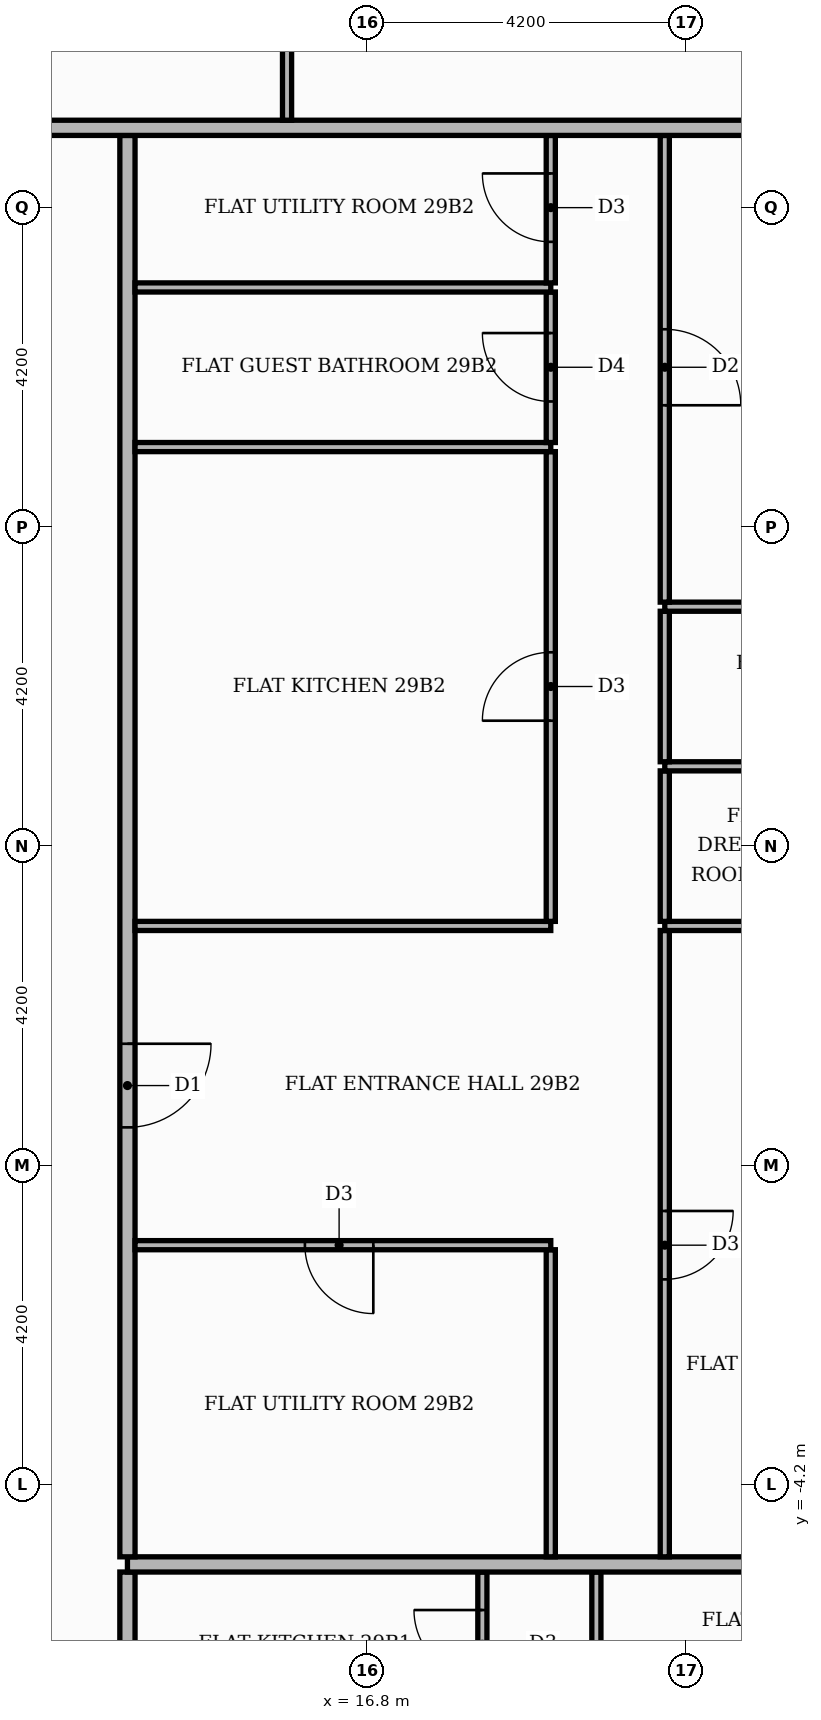
"""IFC4 building model, lengths in metres.
Left out: names, types, materials, properties, quantities, classifications, styles, units other than length and angle.
Written with IfcOpenShell. Run it as: python <this file> out.ifc"""

import sys

from ifc_helpers import new_model, si_unit, direction, frame, frame_2d, origin, place, context, subcontext, project, spatial, rectangle, extrude, element, fill, save


model = new_model("IFC4")
c1 = context("Model", 3, precision=1e-05, world=origin(), true_north=direction((0.0, 1.0)))
c2 = subcontext(c1, "Body", "Model", "MODEL_VIEW")
j1 = project(units=[si_unit("LENGTHUNIT", "METRE"), si_unit("PLANEANGLEUNIT", "RADIAN")], contexts=[c1])
p1 = place(None, origin())
s1 = spatial("IfcSite", under=j1, at=p1, CompositionType="ELEMENT")
p2 = place(p1, origin())
s2 = spatial("IfcBuilding", under=s1, at=p2, CompositionType="ELEMENT")
p3 = place(p2, frame((0.0, 0.0, 122.1)))
s3 = spatial("IfcBuildingStorey", under=s2, at=p3, CompositionType="ELEMENT", Elevation=122.1)
p4 = place(p3, frame((13.65, -13.55, 0.0), z_axis=(0.0, 0.0, 1.0), x_axis=(0.0, 1.0, 0.0)))
e1 = element("IfcWall", 1, at=p4, inside=s3, PredefinedType="PARTITIONING", context=c2, shape_type="SweptSolid", body=[
    extrude(rectangle(XDim=8.2, YDim=0.2, at=frame_2d((4.1, 0.0))), origin(), (0.0, 0.0, 1.0), 3.4),
])
p5 = place(p4, frame((1.45, 0.0, 0.0)))
e2 = element("IfcOpeningElement", 2, at=p5, cuts=e1, PredefinedType="OPENING", context=c2, shape_type="SweptSolid", body=[
    extrude(rectangle(XDim=1.1, YDim=2.4, at=frame_2d((0.55, 1.2))), frame((0.0, 0.11, 0.0), z_axis=(0.0, -1.0, 0.0), x_axis=(1.0, 0.0, 0.0)), (0.0, 0.0, 1.0), 0.22),
])
p6 = place(p3, frame((18.32, -7.29, 0.0), z_axis=(0.0, 0.0, 1.0), x_axis=(0.0, 1.0, 0.0)))
e3 = element("IfcWall", 3, at=p6, inside=s3, PredefinedType="PARTITIONING", context=c2, shape_type="SweptSolid", body=[
    extrude(rectangle(XDim=1.94, YDim=0.12, at=frame_2d((0.97, 0.0))), origin(), (0.0, 0.0, 1.0), 3.4),
])
p7 = place(p6, frame((0.54, 0.0, 0.0)))
e4 = element("IfcOpeningElement", 4, at=p7, cuts=e3, PredefinedType="OPENING", context=c2, shape_type="SweptSolid", body=[
    extrude(rectangle(XDim=0.9, YDim=2.1, at=frame_2d((0.45, 1.05))), frame((0.0, 0.07, 0.0), z_axis=(0.0, -1.0, 0.0), x_axis=(1.0, 0.0, 0.0)), (0.0, 0.0, 1.0), 0.14),
])
p8 = place(p3, frame((19.82, -7.29, 0.0), z_axis=(0.0, 0.0, 1.0), x_axis=(0.0, 1.0, 0.0)))
e5 = element("IfcWall", 5, at=p8, inside=s3, PredefinedType="PARTITIONING", context=c2, shape_type="SweptSolid", body=[
    extrude(rectangle(XDim=1.94, YDim=0.12, at=frame_2d((0.97, 0.0))), origin(), (0.0, 0.0, 1.0), 3.4),
])
p9 = place(p3, frame((13.65, -5.25, 0.0), z_axis=(0.0, 0.0, 1.0), x_axis=(1.0, 0.0, 0.0)))
e6 = element("IfcWall", 6, at=p9, inside=s3, PredefinedType="PARTITIONING", context=c2, shape_type="SweptSolid", body=[
    extrude(rectangle(XDim=11.77, YDim=0.2, at=frame_2d((5.885, 0.0))), origin(), (0.0, 0.0, 1.0), 3.4),
])
p10 = place(p3, frame((13.65, -5.15, 0.0), z_axis=(0.0, 0.0, 1.0), x_axis=(0.0, 1.0, 0.0)))
e7 = element("IfcWall", 7, at=p10, inside=s3, PredefinedType="PARTITIONING", context=c2, shape_type="SweptSolid", body=[
    extrude(rectangle(XDim=18.7, YDim=0.2, at=frame_2d((9.35, 0.0))), origin(), (0.0, 0.0, 1.0), 3.4),
])
p11 = place(p10, frame((5.65, 0.0, 0.0)))
e8 = element("IfcOpeningElement", 8, at=p11, cuts=e7, PredefinedType="OPENING", context=c2, shape_type="SweptSolid", body=[
    extrude(rectangle(XDim=1.1, YDim=2.4, at=frame_2d((0.55, 1.2))), frame((0.0, 0.11, 0.0), z_axis=(0.0, -1.0, 0.0), x_axis=(1.0, 0.0, 0.0)), (0.0, 0.0, 1.0), 0.22),
])
p12 = place(p3, frame((19.22, -5.15, 0.0), z_axis=(0.0, 0.0, 1.0), x_axis=(0.0, 1.0, 0.0)))
e9 = element("IfcWall", 9, at=p12, inside=s3, PredefinedType="PARTITIONING", context=c2, shape_type="SweptSolid", body=[
    extrude(rectangle(XDim=4.04, YDim=0.12, at=frame_2d((2.02, 0.0))), origin(), (0.0, 0.0, 1.0), 3.4),
])
p13 = place(p3, frame((20.72, -5.15, 0.0), z_axis=(0.0, 0.0, 1.0), x_axis=(0.0, 1.0, 0.0)))
e10 = element("IfcWall", 10, at=p13, inside=s3, PredefinedType="PARTITIONING", context=c2, shape_type="SweptSolid", body=[
    extrude(rectangle(XDim=8.24, YDim=0.12, at=frame_2d((4.12, 0.0))), origin(), (0.0, 0.0, 1.0), 3.4),
])
p14 = place(p13, frame((3.65, 0.0, 0.0)))
e11 = element("IfcOpeningElement", 11, at=p14, cuts=e10, PredefinedType="OPENING", context=c2, shape_type="SweptSolid", body=[
    extrude(rectangle(XDim=0.9, YDim=2.1, at=frame_2d((0.45, 1.05))), frame((0.0, 0.07, 0.0), z_axis=(0.0, -1.0, 0.0), x_axis=(1.0, 0.0, 0.0)), (0.0, 0.0, 1.0), 0.14),
])
p15 = place(p3, frame((13.75, -1.05, 0.0), z_axis=(0.0, 0.0, 1.0), x_axis=(1.0, 0.0, 0.0)))
e12 = element("IfcWall", 12, at=p15, inside=s3, PredefinedType="PARTITIONING", context=c2, shape_type="SweptSolid", body=[
    extrude(rectangle(XDim=5.47, YDim=0.12, at=frame_2d((2.735, 0.0))), origin(), (0.0, 0.0, 1.0), 3.4),
])
p16 = place(p15, frame((2.235, 0.0, 0.0)))
e13 = element("IfcOpeningElement", 13, at=p16, cuts=e12, PredefinedType="OPENING", context=c2, shape_type="SweptSolid", body=[
    extrude(rectangle(XDim=0.9, YDim=2.1, at=frame_2d((0.45, 1.05))), frame((0.0, 0.07, 0.0), z_axis=(0.0, -1.0, 0.0), x_axis=(1.0, 0.0, 0.0)), (0.0, 0.0, 1.0), 0.14),
])
p17 = place(p3, frame((13.75, 3.15, 0.0), z_axis=(0.0, 0.0, 1.0), x_axis=(1.0, 0.0, 0.0)))
e14 = element("IfcWall", 14, at=p17, inside=s3, PredefinedType="PARTITIONING", context=c2, shape_type="SweptSolid", body=[
    extrude(rectangle(XDim=5.47, YDim=0.12, at=frame_2d((2.735, 0.0))), origin(), (0.0, 0.0, 1.0), 3.4),
])
p18 = place(p3, frame((20.72, 3.15, 0.0), z_axis=(0.0, 0.0, 1.0), x_axis=(1.0, 0.0, 0.0)))
e15 = element("IfcWall", 15, at=p18, inside=s3, PredefinedType="PARTITIONING", context=c2, shape_type="SweptSolid", body=[
    extrude(rectangle(XDim=4.7, YDim=0.12, at=frame_2d((2.35, 0.0))), origin(), (0.0, 0.0, 1.0), 3.4),
])
p19 = place(p18, frame((2.05, 0.0, 0.0)))
e16 = element("IfcOpeningElement", 16, at=p19, cuts=e15, PredefinedType="OPENING", context=c2, shape_type="SweptSolid", body=[
    extrude(rectangle(XDim=0.9, YDim=2.1, at=frame_2d((0.45, 1.05))), frame((0.0, 0.07, 0.0), z_axis=(0.0, -1.0, 0.0), x_axis=(1.0, 0.0, 0.0)), (0.0, 0.0, 1.0), 0.14),
])
p20 = place(p3, frame((19.22, 3.21, 0.0), z_axis=(0.0, 0.0, 1.0), x_axis=(0.0, 1.0, 0.0)))
e17 = element("IfcWall", 17, at=p20, inside=s3, PredefinedType="PARTITIONING", context=c2, shape_type="SweptSolid", body=[
    extrude(rectangle(XDim=6.18, YDim=0.12, at=frame_2d((3.09, 0.0))), origin(), (0.0, 0.0, 1.0), 3.4),
])
p21 = place(p20, frame((2.64, 0.0, 0.0)))
e18 = element("IfcOpeningElement", 18, at=p21, cuts=e17, PredefinedType="OPENING", context=c2, shape_type="SweptSolid", body=[
    extrude(rectangle(XDim=0.9, YDim=2.1, at=frame_2d((0.45, 1.05))), frame((0.0, 0.07, 0.0), z_axis=(0.0, -1.0, 0.0), x_axis=(1.0, 0.0, 0.0)), (0.0, 0.0, 1.0), 0.14),
])
p22 = place(p3, frame((20.72, 3.21, 0.0), z_axis=(0.0, 0.0, 1.0), x_axis=(0.0, 1.0, 0.0)))
e19 = element("IfcWall", 19, at=p22, inside=s3, PredefinedType="PARTITIONING", context=c2, shape_type="SweptSolid", body=[
    extrude(rectangle(XDim=1.98, YDim=0.12, at=frame_2d((0.99, 0.0))), origin(), (0.0, 0.0, 1.0), 3.4),
])
p23 = place(p3, frame((20.72, 5.25, 0.0), z_axis=(0.0, 0.0, 1.0), x_axis=(1.0, 0.0, 0.0)))
e20 = element("IfcWall", 20, at=p23, inside=s3, PredefinedType="PARTITIONING", context=c2, shape_type="SweptSolid", body=[
    extrude(rectangle(XDim=4.7, YDim=0.12, at=frame_2d((2.35, 0.0))), origin(), (0.0, 0.0, 1.0), 3.4),
])
p24 = place(p23, frame((2.05, 0.0, 0.0)))
e21 = element("IfcOpeningElement", 21, at=p24, cuts=e20, PredefinedType="OPENING", context=c2, shape_type="SweptSolid", body=[
    extrude(rectangle(XDim=0.9, YDim=2.1, at=frame_2d((0.45, 1.05))), frame((0.0, 0.07, 0.0), z_axis=(0.0, -1.0, 0.0), x_axis=(1.0, 0.0, 0.0)), (0.0, 0.0, 1.0), 0.14),
])
p25 = place(p3, frame((20.72, 5.31, 0.0), z_axis=(0.0, 0.0, 1.0), x_axis=(0.0, 1.0, 0.0)))
e22 = element("IfcWall", 22, at=p25, inside=s3, PredefinedType="PARTITIONING", context=c2, shape_type="SweptSolid", body=[
    extrude(rectangle(XDim=1.98, YDim=0.12, at=frame_2d((0.99, 0.0))), origin(), (0.0, 0.0, 1.0), 3.4),
])
p26 = place(p3, frame((20.72, 7.35, 0.0), z_axis=(0.0, 0.0, 1.0), x_axis=(1.0, 0.0, 0.0)))
e23 = element("IfcWall", 23, at=p26, inside=s3, PredefinedType="PARTITIONING", context=c2, shape_type="SweptSolid", body=[
    extrude(rectangle(XDim=4.7, YDim=0.12, at=frame_2d((2.35, 0.0))), origin(), (0.0, 0.0, 1.0), 3.4),
])
p27 = place(p3, frame((20.72, 7.41, 0.0), z_axis=(0.0, 0.0, 1.0), x_axis=(0.0, 1.0, 0.0)))
e24 = element("IfcWall", 24, at=p27, inside=s3, PredefinedType="PARTITIONING", context=c2, shape_type="SweptSolid", body=[
    extrude(rectangle(XDim=6.14, YDim=0.12, at=frame_2d((3.07, 0.0))), origin(), (0.0, 0.0, 1.0), 3.4),
])
p28 = place(p27, frame((2.59, 0.0, 0.0)))
e25 = element("IfcOpeningElement", 25, at=p28, cuts=e24, PredefinedType="OPENING", context=c2, shape_type="SweptSolid", body=[
    extrude(rectangle(XDim=1.0, YDim=2.1, at=frame_2d((0.5, 1.05))), frame((0.0, 0.07, 0.0), z_axis=(0.0, -1.0, 0.0), x_axis=(1.0, 0.0, 0.0)), (0.0, 0.0, 1.0), 0.14),
])
p29 = place(p3, frame((13.75, 9.45, 0.0), z_axis=(0.0, 0.0, 1.0), x_axis=(1.0, 0.0, 0.0)))
e26 = element("IfcWall", 26, at=p29, inside=s3, PredefinedType="PARTITIONING", context=c2, shape_type="SweptSolid", body=[
    extrude(rectangle(XDim=5.47, YDim=0.12, at=frame_2d((2.735, 0.0))), origin(), (0.0, 0.0, 1.0), 3.4),
])
p30 = place(p3, frame((19.22, 9.51, 0.0), z_axis=(0.0, 0.0, 1.0), x_axis=(0.0, 1.0, 0.0)))
e27 = element("IfcWall", 27, at=p30, inside=s3, PredefinedType="PARTITIONING", context=c2, shape_type="SweptSolid", body=[
    extrude(rectangle(XDim=1.98, YDim=0.12, at=frame_2d((0.99, 0.0))), origin(), (0.0, 0.0, 1.0), 3.4),
])
p31 = place(p30, frame((0.54, 0.0, 0.0)))
e28 = element("IfcOpeningElement", 28, at=p31, cuts=e27, PredefinedType="OPENING", context=c2, shape_type="SweptSolid", body=[
    extrude(rectangle(XDim=0.9, YDim=2.1, at=frame_2d((0.45, 1.05))), frame((0.0, 0.07, 0.0), z_axis=(0.0, -1.0, 0.0), x_axis=(1.0, 0.0, 0.0)), (0.0, 0.0, 1.0), 0.14),
])
p32 = place(p3, frame((13.75, 11.55, 0.0), z_axis=(0.0, 0.0, 1.0), x_axis=(1.0, 0.0, 0.0)))
e29 = element("IfcWall", 29, at=p32, inside=s3, PredefinedType="PARTITIONING", context=c2, shape_type="SweptSolid", body=[
    extrude(rectangle(XDim=5.47, YDim=0.12, at=frame_2d((2.735, 0.0))), origin(), (0.0, 0.0, 1.0), 3.4),
])
p33 = place(p3, frame((19.22, 11.61, 0.0), z_axis=(0.0, 0.0, 1.0), x_axis=(0.0, 1.0, 0.0)))
e30 = element("IfcWall", 30, at=p33, inside=s3, PredefinedType="PARTITIONING", context=c2, shape_type="SweptSolid", body=[
    extrude(rectangle(XDim=1.94, YDim=0.12, at=frame_2d((0.97, 0.0))), origin(), (0.0, 0.0, 1.0), 3.4),
])
p34 = place(p33, frame((0.54, 0.0, 0.0)))
e31 = element("IfcOpeningElement", 31, at=p34, cuts=e30, PredefinedType="OPENING", context=c2, shape_type="SweptSolid", body=[
    extrude(rectangle(XDim=0.9, YDim=2.1, at=frame_2d((0.45, 1.05))), frame((0.0, 0.07, 0.0), z_axis=(0.0, -1.0, 0.0), x_axis=(1.0, 0.0, 0.0)), (0.0, 0.0, 1.0), 0.14),
])
p35 = place(p3, frame((-13.65, 13.65, 0.0), z_axis=(0.0, 0.0, 1.0), x_axis=(1.0, 0.0, 0.0)))
e32 = element("IfcWall", 32, at=p35, inside=s3, PredefinedType="PARTITIONING", context=c2, shape_type="SweptSolid", body=[
    extrude(rectangle(XDim=39.07, YDim=0.2, at=frame_2d((19.535, 0.0))), origin(), (0.0, 0.0, 1.0), 3.4),
])
p36 = place(p35, frame((24.65, 0.0, 0.0)))
e33 = element("IfcOpeningElement", 33, at=p36, cuts=e32, PredefinedType="OPENING", context=c2, shape_type="SweptSolid", body=[
    extrude(rectangle(XDim=1.1, YDim=2.4, at=frame_2d((0.55, 1.2))), frame((0.0, 0.11, 0.0), z_axis=(0.0, -1.0, 0.0), x_axis=(1.0, 0.0, 0.0)), (0.0, 0.0, 1.0), 0.22),
])
p37 = place(p35, frame((12.05, 0.0, 0.0)))
e34 = element("IfcOpeningElement", 34, at=p37, cuts=e32, PredefinedType="OPENING", context=c2, shape_type="SweptSolid", body=[
    extrude(rectangle(XDim=1.1, YDim=2.4, at=frame_2d((0.55, 1.2))), frame((0.0, 0.11, 0.0), z_axis=(0.0, -1.0, 0.0), x_axis=(1.0, 0.0, 0.0)), (0.0, 0.0, 1.0), 0.22),
])
p38 = place(p3, frame((15.75, 13.75, 0.0), z_axis=(0.0, 0.0, 1.0), x_axis=(0.0, 1.0, 0.0)))
e35 = element("IfcWall", 35, at=p38, inside=s3, PredefinedType="PARTITIONING", context=c2, shape_type="SweptSolid", body=[
    extrude(rectangle(XDim=6.01, YDim=0.12, at=frame_2d((3.005, 0.0))), origin(), (0.0, 0.0, 1.0), 3.4),
])
p39 = place(p38, frame((2.485, 0.0, 0.0)))
e36 = element("IfcOpeningElement", 36, at=p39, cuts=e35, PredefinedType="OPENING", context=c2, shape_type="SweptSolid", body=[
    extrude(rectangle(XDim=1.0, YDim=2.1, at=frame_2d((0.5, 1.05))), frame((0.0, 0.07, 0.0), z_axis=(0.0, -1.0, 0.0), x_axis=(1.0, 0.0, 0.0)), (0.0, 0.0, 1.0), 0.14),
])
p40 = place(p7, origin())
e37 = element("IfcDoor", 37, at=p40, inside=s3, OperationType="SINGLE_SWING_RIGHT", PredefinedType="DOOR", context=c2, shape_type="SweptSolid", body=[
    extrude(rectangle(XDim=0.9, YDim=2.1, at=frame_2d((0.45, 1.05))), frame((0.0, 0.025, 0.0), z_axis=(0.0, -1.0, 0.0), x_axis=(1.0, 0.0, 0.0)), (0.0, 0.0, 1.0), 0.05),
])
fill(e4, e37)
p41 = place(p11, frame((1.1, 0.0, 0.0), z_axis=(0.0, 0.0, 1.0), x_axis=(-1.0, 0.0, 0.0)))
e38 = element("IfcDoor", 38, at=p41, inside=s3, OperationType="SINGLE_SWING_RIGHT", PredefinedType="DOOR", context=c2, shape_type="SweptSolid", body=[
    extrude(rectangle(XDim=1.1, YDim=2.4, at=frame_2d((0.55, 1.2))), frame((0.0, 0.025, 0.0), z_axis=(0.0, -1.0, 0.0), x_axis=(1.0, 0.0, 0.0)), (0.0, 0.0, 1.0), 0.05),
])
fill(e8, e38)
p42 = place(p16, frame((0.9, 0.0, 0.0), z_axis=(0.0, 0.0, 1.0), x_axis=(-1.0, 0.0, 0.0)))
e39 = element("IfcDoor", 39, at=p42, inside=s3, OperationType="SINGLE_SWING_RIGHT", PredefinedType="DOOR", context=c2, shape_type="SweptSolid", body=[
    extrude(rectangle(XDim=0.9, YDim=2.1, at=frame_2d((0.45, 1.05))), frame((0.0, 0.025, 0.0), z_axis=(0.0, -1.0, 0.0), x_axis=(1.0, 0.0, 0.0)), (0.0, 0.0, 1.0), 0.05),
])
fill(e13, e39)
p43 = place(p21, origin())
e40 = element("IfcDoor", 40, at=p43, inside=s3, OperationType="SINGLE_SWING_LEFT", PredefinedType="DOOR", context=c2, shape_type="SweptSolid", body=[
    extrude(rectangle(XDim=0.9, YDim=2.1, at=frame_2d((0.45, 1.05))), frame((0.0, 0.025, 0.0), z_axis=(0.0, -1.0, 0.0), x_axis=(1.0, 0.0, 0.0)), (0.0, 0.0, 1.0), 0.05),
])
fill(e18, e40)
p44 = place(p31, origin())
e41 = element("IfcDoor", 41, at=p44, inside=s3, OperationType="SINGLE_SWING_RIGHT", PredefinedType="DOOR", context=c2, shape_type="SweptSolid", body=[
    extrude(rectangle(XDim=0.9, YDim=2.1, at=frame_2d((0.45, 1.05))), frame((0.0, 0.025, 0.0), z_axis=(0.0, -1.0, 0.0), x_axis=(1.0, 0.0, 0.0)), (0.0, 0.0, 1.0), 0.05),
])
fill(e28, e41)
p45 = place(p34, origin())
e42 = element("IfcDoor", 42, at=p45, inside=s3, OperationType="SINGLE_SWING_RIGHT", PredefinedType="DOOR", context=c2, shape_type="SweptSolid", body=[
    extrude(rectangle(XDim=0.9, YDim=2.1, at=frame_2d((0.45, 1.05))), frame((0.0, 0.025, 0.0), z_axis=(0.0, -1.0, 0.0), x_axis=(1.0, 0.0, 0.0)), (0.0, 0.0, 1.0), 0.05),
])
fill(e31, e42)
p46 = place(p14, frame((0.9, 0.0, 0.0), z_axis=(0.0, 0.0, 1.0), x_axis=(-1.0, 0.0, 0.0)))
e43 = element("IfcDoor", 43, at=p46, inside=s3, OperationType="SINGLE_SWING_RIGHT", PredefinedType="DOOR", context=c2, shape_type="SweptSolid", body=[
    extrude(rectangle(XDim=0.9, YDim=2.1, at=frame_2d((0.45, 1.05))), frame((0.0, 0.025, 0.0), z_axis=(0.0, -1.0, 0.0), x_axis=(1.0, 0.0, 0.0)), (0.0, 0.0, 1.0), 0.05),
])
fill(e11, e43)
p47 = place(p28, frame((1.0, 0.0, 0.0), z_axis=(0.0, 0.0, 1.0), x_axis=(-1.0, 0.0, 0.0)))
e44 = element("IfcDoor", 44, at=p47, inside=s3, OperationType="SINGLE_SWING_LEFT", PredefinedType="DOOR", context=c2, shape_type="SweptSolid", body=[
    extrude(rectangle(XDim=1.0, YDim=2.1, at=frame_2d((0.5, 1.05))), frame((0.0, 0.025, 0.0), z_axis=(0.0, -1.0, 0.0), x_axis=(1.0, 0.0, 0.0)), (0.0, 0.0, 1.0), 0.05),
])
fill(e25, e44)
save(model, sys.argv[1])
